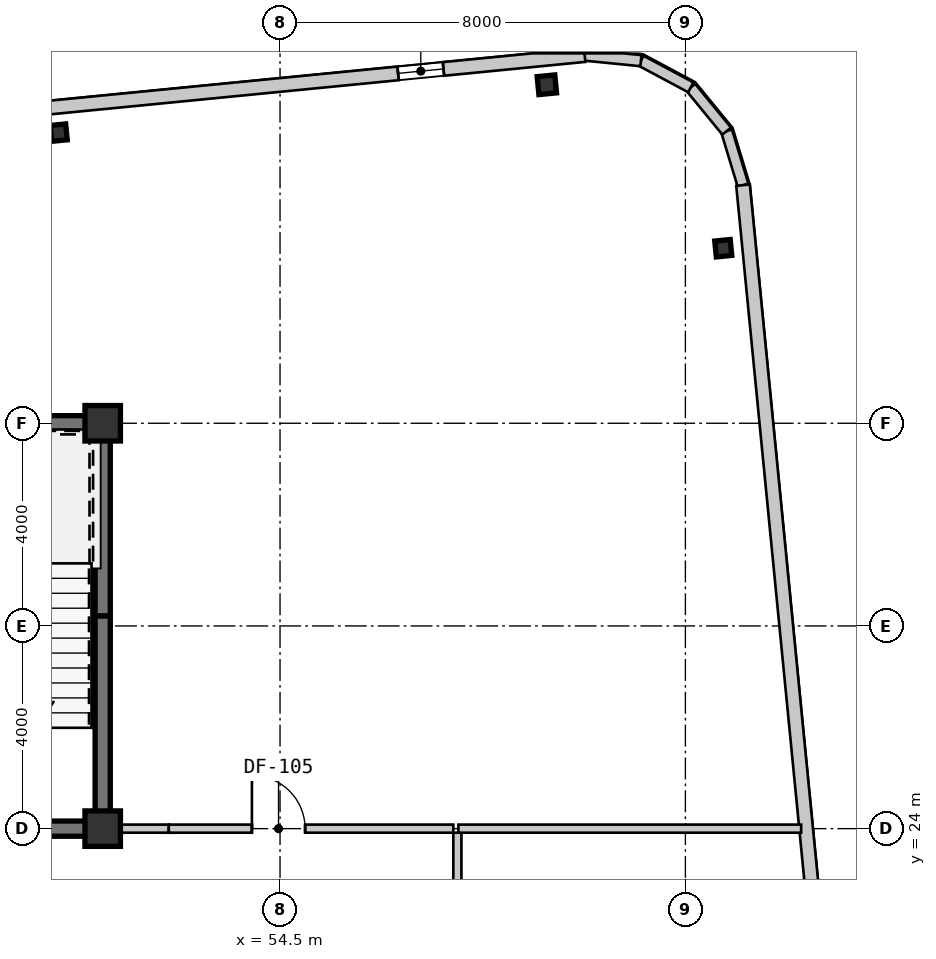
"""IFC4 building model, lengths in metres.
Left out: names, types, materials, properties, quantities, classifications, styles, units other than length and angle.
Written with IfcOpenShell. Run it as: python <this file> out.ifc"""

import sys

from ifc_helpers import new_model, si_unit, direction, frame, frame_2d, origin, origin_2d, place, context, subcontext, project, spatial, rectangle, i_section, extrude, source, transform, mapped, element, fill, save


model = new_model("IFC4")
c1 = context("Model", 3, precision=1e-05, world=origin(), true_north=direction((0.0, 1.0)))
c2 = subcontext(c1, "Body", "Model", "MODEL_VIEW")
j1 = project(units=[si_unit("LENGTHUNIT", "METRE"), si_unit("PLANEANGLEUNIT", "RADIAN")], contexts=[c1])
p1 = place(None, origin())
s1 = spatial("IfcSite", under=j1, at=p1, CompositionType="ELEMENT")
p2 = place(p1, origin())
s2 = spatial("IfcBuilding", under=s1, at=p2, CompositionType="ELEMENT")
p3 = place(p2, frame((0.0, 0.0, 112.35)))
s3 = spatial("IfcBuildingStorey", under=s2, at=p3, CompositionType="ELEMENT", Elevation=112.35)
m1 = source(origin(), c2, "Body", "SweptSolid", [
    extrude(rectangle(XDim=0.7, YDim=0.7, at=origin_2d()), origin(), (0.0, 0.0, 1.0), 4.2),
])
for number, where, z_axis, x_axis in (
    (1, (51.0, 24.0, 0.0), (0.0, 0.0, 1.0), (1.0, 0.0, 0.0)),
    (2, (51.0, 32.0, 0.0), (0.0, 0.0, 1.0), (1.0, 0.0, 0.0)),
):
    element("IfcColumn", number, at=place(p3, frame(where, z_axis=z_axis, x_axis=x_axis)), inside=s3, PredefinedType="COLUMN", context=c2, shape_type="MappedRepresentation", body=[
        mapped(m1, transform((0.0, 0.0, 0.0), scale=1.0)),
    ])
m2 = source(origin(), c2, "Body", "SweptSolid", [
    extrude(i_section(OverallWidth=0.307, OverallDepth=0.315, WebThickness=0.012, FlangeThickness=0.019, at=origin_2d()), origin(), (0.0, 0.0, 1.0), 4.2),
])
p4 = place(p3, frame((50.132, 37.735, 0.0), z_axis=(0.0, 0.0, 1.0), x_axis=(0.995227399982, 0.097582899759, 0.0)))
e3 = element("IfcColumn", 3, at=p4, inside=s3, PredefinedType="COLUMN", context=c2, shape_type="MappedRepresentation", body=[
    mapped(m2, transform((0.0, 0.0, 0.0), scale=1.0)),
])
m3 = source(origin(), c2, "Body", "SweptSolid", [
    extrude(i_section(OverallWidth=0.35, OverallDepth=0.356, WebThickness=0.018, FlangeThickness=0.028, at=origin_2d()), origin(), (0.0, 0.0, 1.0), 4.2),
])
p5 = place(p3, frame((59.766, 38.68, 0.0), z_axis=(0.0, 0.0, 1.0), x_axis=(0.995227399982, 0.097582899759, 0.0)))
e4 = element("IfcColumn", 4, at=p5, inside=s3, PredefinedType="COLUMN", context=c2, shape_type="MappedRepresentation", body=[
    mapped(m3, transform((0.0, 0.0, 0.0), scale=1.0)),
])
p6 = place(p3, frame((63.247, 35.454, 0.0), z_axis=(0.0, 0.0, 1.0), x_axis=(0.995227399982, 0.097582899759, 0.0)))
e5 = element("IfcColumn", 5, at=p6, inside=s3, PredefinedType="COLUMN", context=c2, shape_type="MappedRepresentation", body=[
    mapped(m2, transform((0.0, 0.0, 0.0), scale=1.0)),
])
m4 = source(origin(), c2, "Body", "SweptSolid", [
    extrude(rectangle(XDim=1.116, YDim=0.22, at=frame_2d((0.558, 0.0))), origin(), (0.0, 0.0, 1.0), 3.78),
])
p7 = place(p3, frame((63.638, 36.698, 0.0), z_axis=(0.0, 0.0, 1.0), x_axis=(-0.289855603468, 0.957070388811, 0.0)))
e6 = element("IfcWall", 6, at=p7, inside=s3, PredefinedType="SOLIDWALL", context=c2, shape_type="MappedRepresentation", body=[
    mapped(m4, transform((0.0, 0.0, 0.0), scale=1.0)),
])
m5 = source(origin(), c2, "Body", "SweptSolid", [
    extrude(rectangle(XDim=1.116, YDim=0.22, at=frame_2d((0.558, 0.0))), origin(), (0.0, 0.0, 1.0), 3.78),
])
p8 = place(p3, frame((63.314, 37.766, 0.0), z_axis=(0.0, 0.0, 1.0), x_axis=(-0.634095287989, 0.773254916409, 0.0)))
e7 = element("IfcWall", 7, at=p8, inside=s3, PredefinedType="SOLIDWALL", context=c2, shape_type="MappedRepresentation", body=[
    mapped(m5, transform((0.0, 0.0, 0.0), scale=1.0)),
])
for number, where, z_axis, x_axis in (
    (8, (62.607, 38.629, 0.0), (0.0, 0.0, 1.0), (-0.882, 0.472, 0.0)),
    (9, (61.623, 39.156, 0.0), (0.0, 0.0, 1.0), (-0.995, 0.098, 0.0)),
):
    element("IfcWall", number, at=place(p3, frame(where, z_axis=z_axis, x_axis=x_axis)), inside=s3, PredefinedType="SOLIDWALL", context=c2, shape_type="MappedRepresentation", body=[
        mapped(m4, transform((0.0, 0.0, 0.0), scale=1.0)),
    ])
m6 = source(origin(), c2, "Body", "SweptSolid", [
    extrude(rectangle(XDim=50.0, YDim=0.27, at=frame_2d((25.0, 0.0))), origin(), (0.0, 0.0, 1.0), 3.78),
])
p9 = place(p3, frame((60.512, 39.266, 0.0), z_axis=(0.0, 0.0, 1.0), x_axis=(-0.995227362914, -0.0975832778, 0.0)))
e10 = element("IfcWall", 10, at=p9, inside=s3, PredefinedType="SOLIDWALL", context=c2, shape_type="MappedRepresentation", body=[
    mapped(m6, transform((0.0, 0.0, 0.0), scale=1.0)),
])
m7 = source(origin(), c2, "Body", "SweptSolid", [
    extrude(rectangle(XDim=0.9, YDim=1.5, at=frame_2d((0.45, 0.75))), frame((0.0, 0.145, 0.0), z_axis=(0.0, -1.0, 0.0), x_axis=(1.0, 0.0, 0.0)), (0.0, 0.0, 1.0), 0.29),
])
p10 = place(p9, frame((2.8, 0.0, 0.7)))
e11 = element("IfcOpeningElement", 11, at=p10, cuts=e10, PredefinedType="OPENING", context=c2, shape_type="MappedRepresentation", body=[
    mapped(m7, transform((0.0, 0.0, 0.0), scale=1.0)),
])
p11 = place(p9, frame((46.3, 0.0, 1.6)))
e12 = element("IfcOpeningElement", 12, at=p11, cuts=e10, PredefinedType="OPENING", context=c2, shape_type="MappedRepresentation", body=[
    mapped(m7, transform((0.0, 0.0, 0.0), scale=1.0)),
])
m8 = source(origin(), c2, "Body", "SweptSolid", [
    extrude(rectangle(XDim=29.5, YDim=0.27, at=frame_2d((14.75, 0.0))), origin(), (0.0, 0.0, 1.0), 3.78),
])
p12 = place(p3, frame((66.516, 7.339, 0.0), z_axis=(0.0, 0.0, 1.0), x_axis=(-0.09758203215, 0.995227485051, 0.0)))
e13 = element("IfcWall", 13, at=p12, inside=s3, PredefinedType="SOLIDWALL", context=c2, shape_type="MappedRepresentation", body=[
    mapped(m8, transform((0.0, 0.0, 0.0), scale=1.0)),
])
m9 = source(origin(), c2, "Body", "SweptSolid", [
    extrude(rectangle(XDim=11.95, YDim=0.3, at=frame_2d((5.975, 0.0))), origin(), (0.0, 0.0, 1.0), 3.78),
])
p13 = place(p3, frame((39.2, 32.0, 0.0), z_axis=(0.0, 0.0, 1.0), x_axis=(1.0, 0.0, 0.0)))
e14 = element("IfcWall", 14, at=p13, inside=s3, PredefinedType="SHEAR", context=c2, shape_type="MappedRepresentation", body=[
    mapped(m9, transform((0.0, 0.0, 0.0), scale=1.0)),
])
m10 = source(origin(), c2, "Body", "SweptSolid", [
    extrude(rectangle(XDim=4.05, YDim=0.3, at=frame_2d((2.025, 0.0))), origin(), (0.0, 0.0, 1.0), 3.78),
])
p14 = place(p3, frame((51.0, 24.15, 0.0), z_axis=(0.0, 0.0, 1.0), x_axis=(0.0, 1.0, 0.0)))
e15 = element("IfcWall", 15, at=p14, inside=s3, PredefinedType="SHEAR", context=c2, shape_type="MappedRepresentation", body=[
    mapped(m10, transform((0.0, 0.0, 0.0), scale=1.0)),
])
m11 = source(origin(), c2, "Body", "SweptSolid", [
    extrude(rectangle(XDim=3.65, YDim=0.3, at=frame_2d((1.825, 0.0))), origin(), (0.0, 0.0, 1.0), 3.78),
])
p15 = place(p3, frame((51.0, 28.2, 0.0), z_axis=(0.0, 0.0, 1.0), x_axis=(0.0, 1.0, 0.0)))
e16 = element("IfcWall", 16, at=p15, inside=s3, PredefinedType="SHEAR", context=c2, shape_type="MappedRepresentation", body=[
    mapped(m11, transform((0.0, 0.0, 0.0), scale=1.0)),
])
m12 = source(origin(), c2, "Body", "SweptSolid", [
    extrude(rectangle(XDim=4.9, YDim=0.3, at=frame_2d((2.45, 0.0))), origin(), (0.0, 0.0, 1.0), 3.78),
])
p16 = place(p3, frame((46.25, 24.0, 0.0), z_axis=(0.0, 0.0, 1.0), x_axis=(1.0, 0.0, 0.0)))
e17 = element("IfcWall", 17, at=p16, inside=s3, PredefinedType="SHEAR", context=c2, shape_type="MappedRepresentation", body=[
    mapped(m12, transform((0.0, 0.0, 0.0), scale=1.0)),
])
m13 = source(origin(), c2, "Body", "SweptSolid", [
    extrude(rectangle(XDim=1.155, YDim=0.16, at=frame_2d((0.577, 0.0))), origin(), (0.0, 0.0, 1.0), 3.178),
])
p17 = place(p3, frame((51.15, 24.0, 0.0), z_axis=(0.0, 0.0, 1.0), x_axis=(1.0, 0.0, 0.0)))
e18 = element("IfcWall", 18, at=p17, inside=s3, PredefinedType="PARTITIONING", context=c2, shape_type="MappedRepresentation", body=[
    mapped(m13, transform((0.0, 0.0, 0.0), scale=1.0)),
])
m14 = source(origin(), c2, "Body", "SweptSolid", [
    extrude(rectangle(XDim=5.615, YDim=0.16, at=frame_2d((2.808, 0.0))), origin(), (0.0, 0.0, 1.0), 3.78),
])
p18 = place(p3, frame((52.304, 24.0, 0.0), z_axis=(0.0, 0.0, 1.0), x_axis=(1.0, 0.0, 0.0)))
e19 = element("IfcWall", 19, at=p18, inside=s3, PredefinedType="PARTITIONING", context=c2, shape_type="MappedRepresentation", body=[
    mapped(m14, transform((0.0, 0.0, 0.0), scale=1.0)),
])
m15 = source(origin(), c2, "Body", "SweptSolid", [
    extrude(rectangle(XDim=1.05, YDim=2.1, at=frame_2d((0.525, 1.05))), frame((0.0, 0.09, 0.0), z_axis=(0.0, -1.0, 0.0), x_axis=(1.0, 0.0, 0.0)), (0.0, 0.0, 1.0), 0.18),
])
p19 = place(p18, frame((1.641, 0.0, 0.0)))
e20 = element("IfcOpeningElement", 20, at=p19, cuts=e19, PredefinedType="OPENING", context=c2, shape_type="MappedRepresentation", body=[
    mapped(m15, transform((0.0, 0.0, 0.0), scale=1.0)),
])
m16 = source(origin(), c2, "Body", "SweptSolid", [
    extrude(rectangle(XDim=1.262, YDim=0.16, at=frame_2d((0.631, 0.0))), origin(), (0.0, 0.0, 1.0), 3.78),
])
p20 = place(p3, frame((58.0, 23.92, 0.0), z_axis=(0.0, 0.0, 1.0), x_axis=(0.0, -1.0, 0.0)))
e21 = element("IfcWall", 21, at=p20, inside=s3, PredefinedType="PARTITIONING", context=c2, shape_type="MappedRepresentation", body=[
    mapped(m16, transform((0.0, 0.0, 0.0), scale=1.0)),
])
m17 = source(origin(), c2, "Body", "SweptSolid", [
    extrude(rectangle(XDim=6.764, YDim=0.16, at=frame_2d((3.382, 0.0))), origin(), (0.0, 0.0, 1.0), 3.78),
])
p21 = place(p3, frame((64.784, 24.0, 0.0), z_axis=(0.0, 0.0, 1.0), x_axis=(-1.0, 0.0, 0.0)))
e22 = element("IfcWall", 22, at=p21, inside=s3, PredefinedType="PARTITIONING", context=c2, shape_type="MappedRepresentation", body=[
    mapped(m17, transform((0.0, 0.0, 0.0), scale=1.0)),
])
m18 = source(origin(), c2, "Body", "SweptSolid", [
    extrude(rectangle(XDim=0.9, YDim=1.5, at=frame_2d((0.45, 0.75))), frame((0.0, 0.03, 0.0), z_axis=(0.0, -1.0, 0.0), x_axis=(1.0, 0.0, 0.0)), (0.0, 0.0, 1.0), 0.06),
])
p22 = place(p10, origin())
e23 = element("IfcWindow", 23, at=p22, inside=s3, PartitioningType="SINGLE_PANEL", PredefinedType="WINDOW", context=c2, shape_type="MappedRepresentation", body=[
    mapped(m18, transform((0.0, 0.0, 0.0), scale=1.0)),
])
fill(e11, e23)
m19 = source(origin(), c2, "Body", "SweptSolid", [
    extrude(rectangle(XDim=1.05, YDim=2.1, at=frame_2d((0.525, 1.05))), frame((0.0, 0.025, 0.0), z_axis=(0.0, -1.0, 0.0), x_axis=(1.0, 0.0, 0.0)), (0.0, 0.0, 1.0), 0.05),
])
p23 = place(p19, origin())
e24 = element("IfcDoor", 24, at=p23, inside=s3, OperationType="SINGLE_SWING_LEFT", PredefinedType="DOOR", context=c2, shape_type="MappedRepresentation", body=[
    mapped(m19, transform((0.0, 0.0, 0.0), scale=1.0)),
])
fill(e20, e24)
save(model, sys.argv[1])
